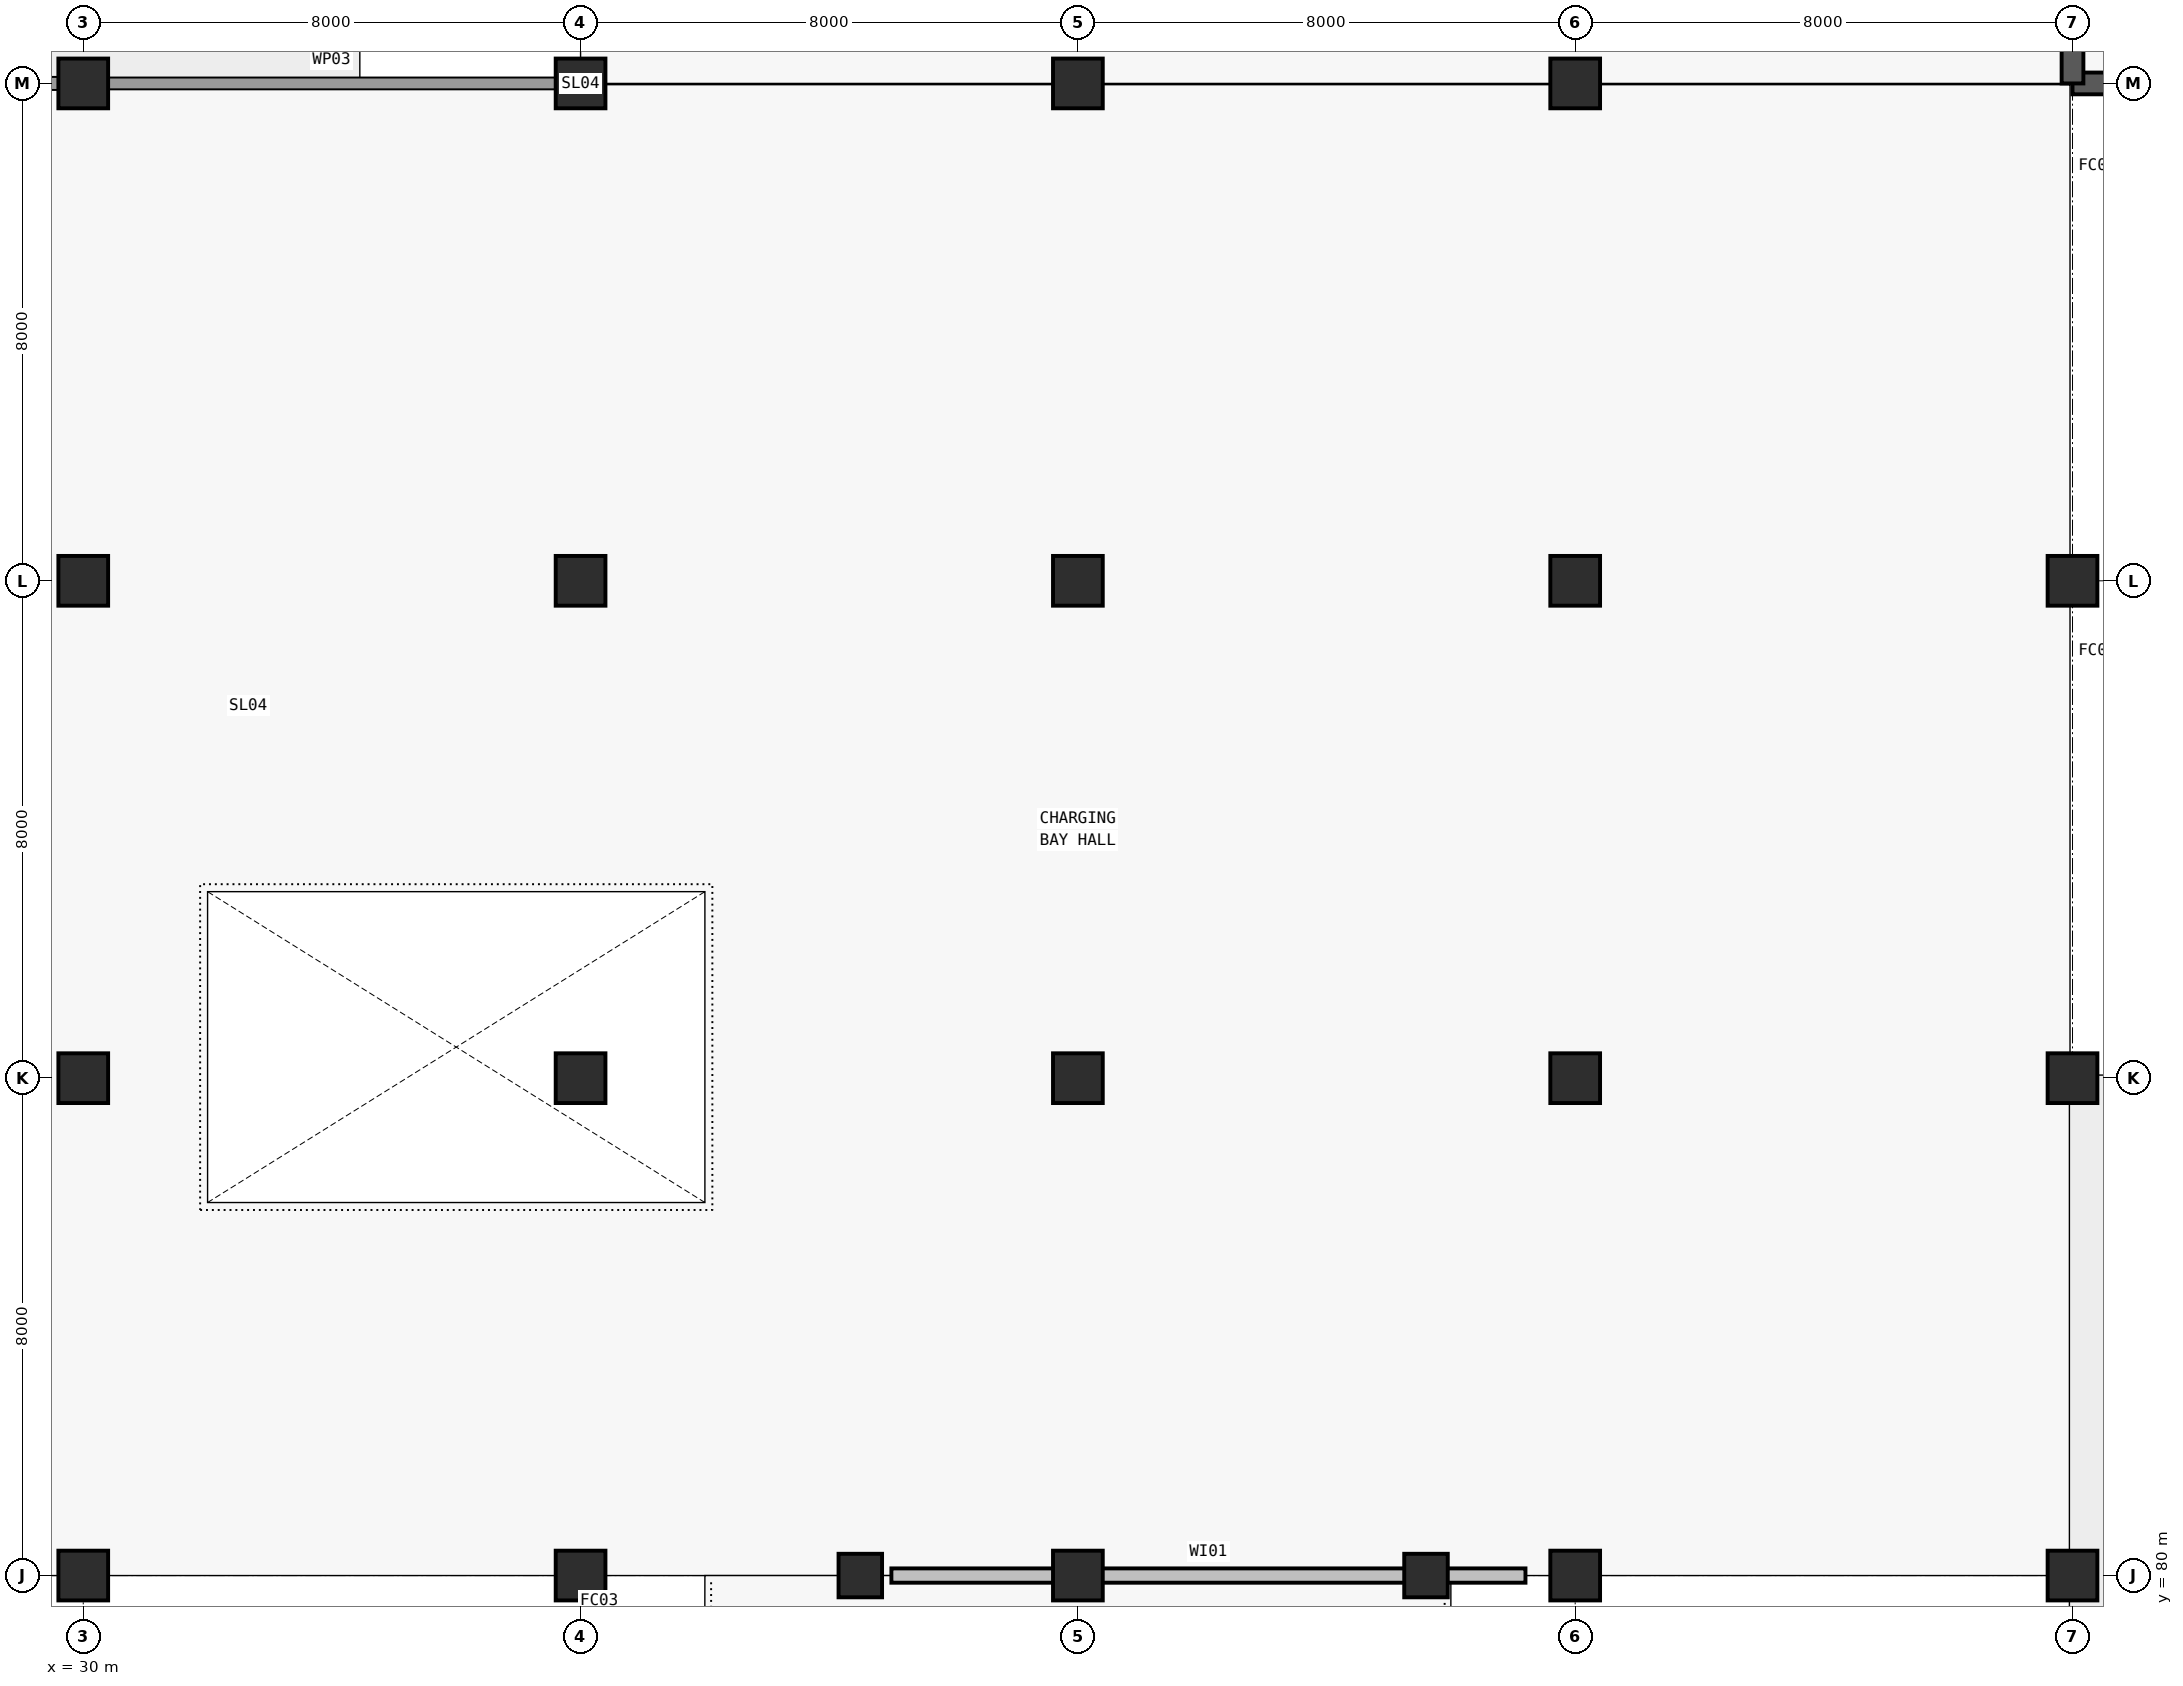
"""IFC4 building model, lengths in metres.
Left out: names, types, materials, properties, quantities, classifications, styles, units other than length and angle.
Written with IfcOpenShell. Run it as: python <this file> out.ifc"""

import sys

from ifc_helpers import new_model, si_unit, direction, frame, frame_2d, origin, origin_2d, place, context, subcontext, project, spatial, rectangle, extrude, element, save


model = new_model("IFC4")
c1 = context("Model", 3, precision=1e-05, world=origin(), true_north=direction((0.0, 1.0)))
c2 = subcontext(c1, "Body", "Model", "MODEL_VIEW")
j1 = project(units=[si_unit("LENGTHUNIT", "METRE"), si_unit("PLANEANGLEUNIT", "RADIAN")], contexts=[c1])
p1 = place(None, origin())
s1 = spatial("IfcSite", under=j1, at=p1, CompositionType="ELEMENT")
p2 = place(p1, origin())
s2 = spatial("IfcBuilding", under=s1, at=p2, CompositionType="ELEMENT")
p3 = place(p2, frame((0.0, 0.0, 9.5)))
s3 = spatial("IfcBuildingStorey", under=s2, at=p3, CompositionType="ELEMENT", Elevation=9.5)
for number, where, z_axis, x_axis in (
    (1, (30.0, 104.0, 0.0), (0.0, 0.0, 1.0), (1.0, 0.0, 0.0)),
    (2, (38.0, 104.0, 0.0), (0.0, 0.0, 1.0), (1.0, 0.0, 0.0)),
    (3, (46.0, 104.0, 0.0), (0.0, 0.0, 1.0), (1.0, 0.0, 0.0)),
    (4, (54.0, 104.0, 0.0), (0.0, 0.0, 1.0), (1.0, 0.0, 0.0)),
    (5, (30.0, 80.0, 0.0), (0.0, 0.0, 1.0), (1.0, 0.0, 0.0)),
    (6, (30.0, 88.0, 0.0), (0.0, 0.0, 1.0), (1.0, 0.0, 0.0)),
    (7, (30.0, 96.0, 0.0), (0.0, 0.0, 1.0), (1.0, 0.0, 0.0)),
    (8, (38.0, 80.0, 0.0), (0.0, 0.0, 1.0), (1.0, 0.0, 0.0)),
    (9, (38.0, 88.0, 0.0), (0.0, 0.0, 1.0), (1.0, 0.0, 0.0)),
    (10, (38.0, 96.0, 0.0), (0.0, 0.0, 1.0), (1.0, 0.0, 0.0)),
    (11, (46.0, 80.0, 0.0), (0.0, 0.0, 1.0), (1.0, 0.0, 0.0)),
    (12, (46.0, 88.0, 0.0), (0.0, 0.0, 1.0), (1.0, 0.0, 0.0)),
    (13, (46.0, 96.0, 0.0), (0.0, 0.0, 1.0), (1.0, 0.0, 0.0)),
    (14, (54.0, 80.0, 0.0), (0.0, 0.0, 1.0), (1.0, 0.0, 0.0)),
    (15, (54.0, 88.0, 0.0), (0.0, 0.0, 1.0), (1.0, 0.0, 0.0)),
    (16, (54.0, 96.0, 0.0), (0.0, 0.0, 1.0), (1.0, 0.0, 0.0)),
    (17, (62.0, 80.0, 0.0), (0.0, 0.0, 1.0), (1.0, 0.0, 0.0)),
    (18, (62.0, 88.0, 0.0), (0.0, 0.0, 1.0), (1.0, 0.0, 0.0)),
    (19, (62.0, 96.0, 0.0), (0.0, 0.0, 1.0), (1.0, 0.0, 0.0)),
):
    element("IfcColumn", number, at=place(p3, frame(where, z_axis=z_axis, x_axis=x_axis)), inside=s3, PredefinedType="COLUMN", context=c2, shape_type="SweptSolid", body=[
        extrude(rectangle(XDim=0.8, YDim=0.8, at=origin_2d()), origin(), (0.0, 0.0, 1.0), 3.9),
    ])
for number, where, z_axis, x_axis in (
    (20, (51.6, 80.0, 0.0), (0.0, 0.0, 1.0), (1.0, 0.0, 0.0)),
    (21, (42.5, 80.0, 0.0), (0.0, 0.0, 1.0), (1.0, 0.0, 0.0)),
):
    element("IfcColumn", number, at=place(p3, frame(where, z_axis=z_axis, x_axis=x_axis)), inside=s3, PredefinedType="COLUMN", context=c2, shape_type="SweptSolid", body=[
        extrude(rectangle(XDim=0.7, YDim=0.7, at=origin_2d()), origin(), (0.0, 0.0, 1.0), 3.9),
    ])
p4 = place(p3, frame((22.375, 104.0, 0.0), z_axis=(0.0, 0.0, 1.0), x_axis=(1.0, 0.0, 0.0)))
e22 = element("IfcWall", 22, at=p4, inside=s3, PredefinedType="PARAPET", context=c2, shape_type="SweptSolid", body=[
    extrude(rectangle(XDim=7.25, YDim=0.21, at=frame_2d((3.625, 0.0))), origin(), (0.0, 0.0, 1.0), 1.15),
])
p5 = place(p3, frame((30.375, 104.0, 0.0), z_axis=(0.0, 0.0, 1.0), x_axis=(1.0, 0.0, 0.0)))
e23 = element("IfcWall", 23, at=p5, inside=s3, PredefinedType="PARAPET", context=c2, shape_type="SweptSolid", body=[
    extrude(rectangle(XDim=7.24, YDim=0.19, at=frame_2d((3.62, 0.0))), origin(), (0.0, 0.0, 1.0), 1.15),
])
p6 = place(p3, frame((62.0, 104.0, 0.0), z_axis=(0.0, 0.0, 1.0), x_axis=(1.0, 0.0, 0.0)))
e24 = element("IfcWall", 24, at=p6, inside=s3, PredefinedType="SHEAR", context=c2, shape_type="SweptSolid", body=[
    extrude(rectangle(XDim=8.0, YDim=0.35, at=frame_2d((4.0, 0.0))), origin(), (0.0, 0.0, 1.0), 3.62),
])
p7 = place(p3, frame((62.0, 113.0, 0.0), z_axis=(0.0, 0.0, 1.0), x_axis=(0.0, -1.0, 0.0)))
e25 = element("IfcWall", 25, at=p7, inside=s3, PredefinedType="SHEAR", context=c2, shape_type="SweptSolid", body=[
    extrude(rectangle(XDim=9.0, YDim=0.35, at=frame_2d((4.5, 0.0))), origin(), (0.0, 0.0, 1.0), 3.62),
])
p8 = place(p3, frame((43.0, 80.0, 0.0), z_axis=(0.0, 0.0, 1.0), x_axis=(1.0, 0.0, 0.0)))
e26 = element("IfcWall", 26, at=p8, inside=s3, PredefinedType="PARTITIONING", context=c2, shape_type="SweptSolid", body=[
    extrude(rectangle(XDim=10.2, YDim=0.23, at=frame_2d((5.1, 0.0))), origin(), (0.0, 0.0, 1.0), 2.48),
])
save(model, sys.argv[1])
